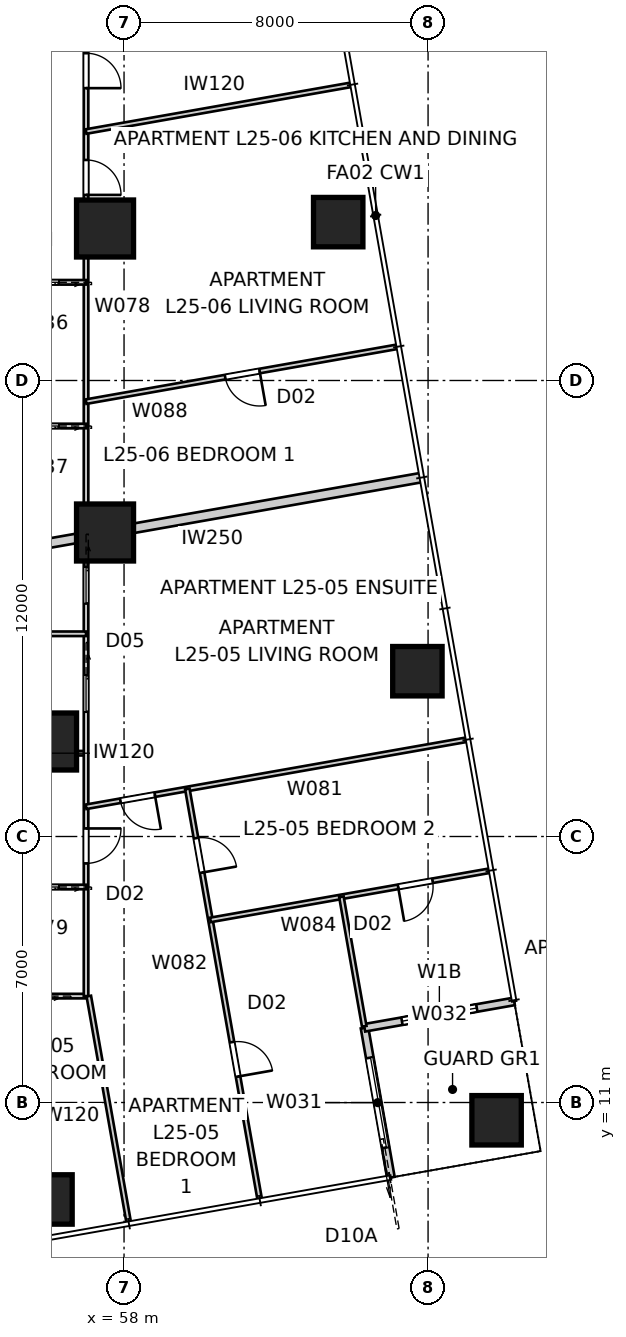
"""IFC4 building model, lengths in metres.
Left out: names, types, materials, properties, quantities, classifications, styles, units other than length and angle.
Written with IfcOpenShell. Run it as: python <this file> out.ifc"""

import sys

from ifc_helpers import new_model, si_unit, direction, frame, frame_2d, origin, origin_2d, place, context, subcontext, project, spatial, rectangle, extrude, element, fill, save


model = new_model("IFC4")
c1 = context("Model", 3, precision=1e-05, world=origin(), true_north=direction((0.0, 1.0)))
c2 = subcontext(c1, "Body", "Model", "MODEL_VIEW")
j1 = project(units=[si_unit("LENGTHUNIT", "METRE"), si_unit("PLANEANGLEUNIT", "RADIAN")], contexts=[c1])
p1 = place(None, origin())
s1 = spatial("IfcSite", under=j1, at=p1, CompositionType="ELEMENT")
p2 = place(p1, origin())
s2 = spatial("IfcBuilding", under=s1, at=p2, CompositionType="ELEMENT")
p3 = place(p2, frame((0.0, 0.0, 93.0)))
s3 = spatial("IfcBuildingStorey", under=s2, at=p3, CompositionType="ELEMENT", Elevation=93.0)
for number, where, z_axis, x_axis in (
    (1, (55.985, 8.448, 0.0), (0.0, 0.0, 1.0), (1.0, 0.0, 0.0)),
    (2, (67.803, 10.532, 0.0), (0.0, 0.0, 1.0), (1.0, 0.0, 0.0)),
    (3, (65.719, 22.35, 0.0), (0.0, 0.0, 1.0), (1.0, 0.0, 0.0)),
    (4, (63.635, 34.167, 0.0), (0.0, 0.0, 1.0), (1.0, 0.0, 0.0)),
):
    element("IfcColumn", number, at=place(p3, frame(where, z_axis=z_axis, x_axis=x_axis)), inside=s3, PredefinedType="COLUMN", context=c2, shape_type="SweptSolid", body=[
        extrude(rectangle(XDim=1.3, YDim=1.3, at=origin_2d()), origin(), (0.0, 0.0, 1.0), 3.4),
    ])
for number, where, z_axis, x_axis in (
    (5, (57.5, 26.0, 0.0), (0.0, 0.0, 1.0), (1.0, 0.0, 0.0)),
    (6, (57.5, 34.0, 0.0), (0.0, 0.0, 1.0), (1.0, 0.0, 0.0)),
    (7, (56.0, 20.5, 0.0), (0.0, 0.0, 1.0), (1.0, 0.0, 0.0)),
):
    element("IfcColumn", number, at=place(p3, frame(where, z_axis=z_axis, x_axis=x_axis)), inside=s3, PredefinedType="COLUMN", context=c2, shape_type="SweptSolid", body=[
        extrude(rectangle(XDim=1.5, YDim=1.5, at=origin_2d()), origin(), (0.0, 0.0, 1.0), 3.4),
    ])
p4 = place(p3, frame((65.022, 9.026, 0.0), z_axis=(0.0, 0.0, 1.0), x_axis=(-0.173646056486, 0.984808127031, 0.0)))
e8 = element("IfcWall", 8, at=p4, inside=s3, PredefinedType="SOLIDWALL", context=c2, shape_type="SweptSolid", body=[
    extrude(rectangle(XDim=4.0, YDim=0.2, at=frame_2d((2.0, 0.0))), origin(), (0.0, 0.0, 1.0), 3.25),
])
p5 = place(p4, frame((0.8, 0.0, 0.0)))
e9 = element("IfcOpeningElement", 9, at=p5, cuts=e8, PredefinedType="OPENING", context=c2, shape_type="SweptSolid", body=[
    extrude(rectangle(XDim=2.4, YDim=2.1, at=frame_2d((1.2, 1.05))), frame((0.0, 0.11, 0.0), z_axis=(0.0, -1.0, 0.0), x_axis=(1.0, 0.0, 0.0)), (0.0, 0.0, 1.0), 0.22),
])
p6 = place(p3, frame((64.328, 12.966, 0.0), z_axis=(0.0, 0.0, 1.0), x_axis=(0.984808127031, 0.173646056486, 0.0)))
e10 = element("IfcWall", 10, at=p6, inside=s3, PredefinedType="SOLIDWALL", context=c2, shape_type="SweptSolid", body=[
    extrude(rectangle(XDim=4.0, YDim=0.2, at=frame_2d((2.0, 0.0))), origin(), (0.0, 0.0, 1.0), 3.25),
])
p7 = place(p6, frame((1.0, 0.0, 0.45)))
e11 = element("IfcOpeningElement", 11, at=p7, cuts=e10, PredefinedType="OPENING", context=c2, shape_type="SweptSolid", body=[
    extrude(rectangle(XDim=2.0, YDim=1.8, at=frame_2d((1.0, 0.9))), frame((0.0, 0.11, 0.0), z_axis=(0.0, -1.0, 0.0), x_axis=(1.0, 0.0, 0.0)), (0.0, 0.0, 1.0), 0.22),
])
p8 = place(p3, frame((65.836, 27.448, 0.0), z_axis=(0.0, 0.0, 1.0), x_axis=(-0.98481000304, -0.173635416642, 0.0)))
e12 = element("IfcWall", 12, at=p8, inside=s3, PredefinedType="PARTITIONING", context=c2, shape_type="SweptSolid", body=[
    extrude(rectangle(XDim=11.427, YDim=0.25, at=frame_2d((5.713, 0.0))), origin(), (0.0, 0.0, 1.0), 3.25),
])
p9 = place(p3, frame((57.0, 13.8, 0.0), z_axis=(0.0, 0.0, 1.0), x_axis=(-1.0, 0.0, 0.0)))
e13 = element("IfcWall", 13, at=p9, inside=s3, PredefinedType="PARTITIONING", context=c2, shape_type="SweptSolid", body=[
    extrude(rectangle(XDim=34.0, YDim=0.12, at=frame_2d((17.0, 0.0))), origin(), (0.0, 0.0, 1.0), 2.55),
])
p10 = place(p9, frame((8.768, 0.0, 0.0)))
e14 = element("IfcOpeningElement", 14, at=p10, cuts=e13, PredefinedType="OPENING", context=c2, shape_type="SweptSolid", body=[
    extrude(rectangle(XDim=0.92, YDim=2.34, at=frame_2d((0.46, 1.17))), frame((0.0, 0.07, 0.0), z_axis=(0.0, -1.0, 0.0), x_axis=(1.0, 0.0, 0.0)), (0.0, 0.0, 1.0), 0.14),
])
p11 = place(p9, frame((10.995, 0.0, 0.0)))
e15 = element("IfcOpeningElement", 15, at=p11, cuts=e13, PredefinedType="OPENING", context=c2, shape_type="SweptSolid", body=[
    extrude(rectangle(XDim=0.92, YDim=2.34, at=frame_2d((0.46, 1.17))), frame((0.0, 0.07, 0.0), z_axis=(0.0, -1.0, 0.0), x_axis=(1.0, 0.0, 0.0)), (0.0, 0.0, 1.0), 0.14),
])
p12 = place(p9, frame((15.486, 0.0, 0.0)))
e16 = element("IfcOpeningElement", 16, at=p12, cuts=e13, PredefinedType="OPENING", context=c2, shape_type="SweptSolid", body=[
    extrude(rectangle(XDim=0.92, YDim=2.34, at=frame_2d((0.46, 1.17))), frame((0.0, 0.07, 0.0), z_axis=(0.0, -1.0, 0.0), x_axis=(1.0, 0.0, 0.0)), (0.0, 0.0, 1.0), 0.14),
])
p13 = place(p9, frame((4.804, 0.0, 0.0)))
e17 = element("IfcOpeningElement", 17, at=p13, cuts=e13, PredefinedType="OPENING", context=c2, shape_type="SweptSolid", body=[
    extrude(rectangle(XDim=0.96, YDim=2.1, at=frame_2d((0.48, 1.05))), frame((0.0, 0.07, 0.0), z_axis=(0.0, -1.0, 0.0), x_axis=(1.0, 0.0, 0.0)), (0.0, 0.0, 1.0), 0.14),
])
p14 = place(p9, frame((19.155, 0.0, 0.0)))
e18 = element("IfcOpeningElement", 18, at=p14, cuts=e13, PredefinedType="OPENING", context=c2, shape_type="SweptSolid", body=[
    extrude(rectangle(XDim=0.96, YDim=2.1, at=frame_2d((0.48, 1.05))), frame((0.0, 0.07, 0.0), z_axis=(0.0, -1.0, 0.0), x_axis=(1.0, 0.0, 0.0)), (0.0, 0.0, 1.0), 0.14),
])
p15 = place(p9, frame((31.473, 0.0, 0.0)))
e19 = element("IfcOpeningElement", 19, at=p15, cuts=e13, PredefinedType="OPENING", context=c2, shape_type="SweptSolid", body=[
    extrude(rectangle(XDim=0.96, YDim=2.1, at=frame_2d((0.48, 1.05))), frame((0.0, 0.07, 0.0), z_axis=(0.0, -1.0, 0.0), x_axis=(1.0, 0.0, 0.0)), (0.0, 0.0, 1.0), 0.14),
])
p16 = place(p9, frame((1.261, 0.0, 0.0)))
e20 = element("IfcOpeningElement", 20, at=p16, cuts=e13, PredefinedType="OPENING", context=c2, shape_type="SweptSolid", body=[
    extrude(rectangle(XDim=0.96, YDim=2.1, at=frame_2d((0.48, 1.05))), frame((0.0, 0.07, 0.0), z_axis=(0.0, -1.0, 0.0), x_axis=(1.0, 0.0, 0.0)), (0.0, 0.0, 1.0), 0.14),
])
p17 = place(p9, frame((22.627, 0.0, 0.0)))
e21 = element("IfcOpeningElement", 21, at=p17, cuts=e13, PredefinedType="OPENING", context=c2, shape_type="SweptSolid", body=[
    extrude(rectangle(XDim=0.96, YDim=2.1, at=frame_2d((0.48, 1.05))), frame((0.0, 0.07, 0.0), z_axis=(0.0, -1.0, 0.0), x_axis=(1.0, 0.0, 0.0)), (0.0, 0.0, 1.0), 0.14),
])
p18 = place(p3, frame((54.6, 20.192, 0.0), z_axis=(0.0, 0.0, 1.0), x_axis=(1.0, 0.0, 0.0)))
e22 = element("IfcWall", 22, at=p18, inside=s3, PredefinedType="PARTITIONING", context=c2, shape_type="SweptSolid", body=[
    extrude(rectangle(XDim=2.4, YDim=0.12, at=frame_2d((1.2, 0.0))), origin(), (0.0, 0.0, 1.0), 3.25),
])
p19 = place(p3, frame((57.0, 46.2, 0.0), z_axis=(0.0, 0.0, 1.0), x_axis=(0.0, -1.0, 0.0)))
e23 = element("IfcWall", 23, at=p19, inside=s3, PredefinedType="PARTITIONING", context=c2, shape_type="SweptSolid", body=[
    extrude(rectangle(XDim=32.4, YDim=0.12, at=frame_2d((16.2, 0.0))), origin(), (0.0, 0.0, 1.0), 2.55),
])
p20 = place(p19, frame((10.396, 0.0, 0.0)))
e24 = element("IfcOpeningElement", 24, at=p20, cuts=e23, PredefinedType="OPENING", context=c2, shape_type="SweptSolid", body=[
    extrude(rectangle(XDim=0.92, YDim=2.34, at=frame_2d((0.46, 1.17))), frame((0.0, 0.07, 0.0), z_axis=(0.0, -1.0, 0.0), x_axis=(1.0, 0.0, 0.0)), (0.0, 0.0, 1.0), 0.14),
])
p21 = place(p19, frame((7.587, 0.0, 0.0)))
e25 = element("IfcOpeningElement", 25, at=p21, cuts=e23, PredefinedType="OPENING", context=c2, shape_type="SweptSolid", body=[
    extrude(rectangle(XDim=0.92, YDim=2.34, at=frame_2d((0.46, 1.17))), frame((0.0, 0.07, 0.0), z_axis=(0.0, -1.0, 0.0), x_axis=(1.0, 0.0, 0.0)), (0.0, 0.0, 1.0), 0.14),
])
p22 = place(p19, frame((3.843, 0.0, 0.0)))
e26 = element("IfcOpeningElement", 26, at=p22, cuts=e23, PredefinedType="OPENING", context=c2, shape_type="SweptSolid", body=[
    extrude(rectangle(XDim=0.92, YDim=2.34, at=frame_2d((0.46, 1.17))), frame((0.0, 0.07, 0.0), z_axis=(0.0, -1.0, 0.0), x_axis=(1.0, 0.0, 0.0)), (0.0, 0.0, 1.0), 0.14),
])
p23 = place(p19, frame((27.988, 0.0, 0.0)))
e27 = element("IfcOpeningElement", 27, at=p23, cuts=e23, PredefinedType="OPENING", context=c2, shape_type="SweptSolid", body=[
    extrude(rectangle(XDim=0.92, YDim=2.34, at=frame_2d((0.46, 1.17))), frame((0.0, 0.07, 0.0), z_axis=(0.0, -1.0, 0.0), x_axis=(1.0, 0.0, 0.0)), (0.0, 0.0, 1.0), 0.14),
])
p24 = place(p19, frame((23.957, 0.0, 0.0)))
e28 = element("IfcOpeningElement", 28, at=p24, cuts=e23, PredefinedType="OPENING", context=c2, shape_type="SweptSolid", body=[
    extrude(rectangle(XDim=0.96, YDim=2.1, at=frame_2d((0.48, 1.05))), frame((0.0, 0.07, 0.0), z_axis=(0.0, -1.0, 0.0), x_axis=(1.0, 0.0, 0.0)), (0.0, 0.0, 1.0), 0.14),
])
p25 = place(p19, frame((21.108, 0.0, 0.0)))
e29 = element("IfcOpeningElement", 29, at=p25, cuts=e23, PredefinedType="OPENING", context=c2, shape_type="SweptSolid", body=[
    extrude(rectangle(XDim=0.96, YDim=2.1, at=frame_2d((0.48, 1.05))), frame((0.0, 0.07, 0.0), z_axis=(0.0, -1.0, 0.0), x_axis=(1.0, 0.0, 0.0)), (0.0, 0.0, 1.0), 0.14),
])
p26 = place(p3, frame((57.0, 16.671, 0.0), z_axis=(0.0, 0.0, 1.0), x_axis=(-1.0, 0.0, 0.0)))
e30 = element("IfcWall", 30, at=p26, inside=s3, PredefinedType="PARTITIONING", context=c2, shape_type="SweptSolid", body=[
    extrude(rectangle(XDim=2.4, YDim=0.12, at=frame_2d((1.2, 0.0))), origin(), (0.0, 0.0, 1.0), 3.25),
])
p27 = place(p26, frame((0.72, 0.0, 0.0)))
e31 = element("IfcOpeningElement", 31, at=p27, cuts=e30, PredefinedType="OPENING", context=c2, shape_type="SweptSolid", body=[
    extrude(rectangle(XDim=0.96, YDim=2.1, at=frame_2d((0.48, 1.05))), frame((0.0, 0.07, 0.0), z_axis=(0.0, -1.0, 0.0), x_axis=(1.0, 0.0, 0.0)), (0.0, 0.0, 1.0), 0.14),
])
p28 = place(p3, frame((54.6, 23.335, 0.0), z_axis=(0.0, 0.0, 1.0), x_axis=(1.0, 0.0, 0.0)))
e32 = element("IfcWall", 32, at=p28, inside=s3, PredefinedType="PARTITIONING", context=c2, shape_type="SweptSolid", body=[
    extrude(rectangle(XDim=2.4, YDim=0.12, at=frame_2d((1.2, 0.0))), origin(), (0.0, 0.0, 1.0), 3.25),
])
p29 = place(p3, frame((67.012, 20.547, 0.0), z_axis=(0.0, 0.0, 1.0), x_axis=(-0.984807724889, -0.173648337162, 0.0)))
e33 = element("IfcWall", 33, at=p29, inside=s3, PredefinedType="PARTITIONING", context=c2, shape_type="SweptSolid", body=[
    extrude(rectangle(XDim=10.167, YDim=0.12, at=frame_2d((5.083, 0.0))), origin(), (0.0, 0.0, 1.0), 2.638),
])
p30 = place(p29, frame((8.328, 0.0, 0.0)))
e34 = element("IfcOpeningElement", 34, at=p30, cuts=e33, PredefinedType="OPENING", context=c2, shape_type="SweptSolid", body=[
    extrude(rectangle(XDim=0.92, YDim=2.34, at=frame_2d((0.46, 1.17))), frame((0.0, 0.07, 0.0), z_axis=(0.0, -1.0, 0.0), x_axis=(1.0, 0.0, 0.0)), (0.0, 0.0, 1.0), 0.14),
])
p31 = place(p3, frame((59.665, 19.251, 0.0), z_axis=(0.0, 0.0, 1.0), x_axis=(0.173639194339, -0.984809336973, 0.0)))
e35 = element("IfcWall", 35, at=p31, inside=s3, PredefinedType="PARTITIONING", context=c2, shape_type="SweptSolid", body=[
    extrude(rectangle(XDim=10.96, YDim=0.12, at=frame_2d((5.48, 0.0))), origin(), (0.0, 0.0, 1.0), 3.25),
])
p32 = place(p31, frame((6.765, 0.0, 0.0)))
e36 = element("IfcOpeningElement", 36, at=p32, cuts=e35, PredefinedType="OPENING", context=c2, shape_type="SweptSolid", body=[
    extrude(rectangle(XDim=0.92, YDim=2.34, at=frame_2d((0.46, 1.17))), frame((0.0, 0.07, 0.0), z_axis=(0.0, -1.0, 0.0), x_axis=(1.0, 0.0, 0.0)), (0.0, 0.0, 1.0), 0.14),
])
p33 = place(p31, frame((1.315, 0.0, 0.0)))
e37 = element("IfcOpeningElement", 37, at=p33, cuts=e35, PredefinedType="OPENING", context=c2, shape_type="SweptSolid", body=[
    extrude(rectangle(XDim=0.92, YDim=2.34, at=frame_2d((0.46, 1.17))), frame((0.0, 0.07, 0.0), z_axis=(0.0, -1.0, 0.0), x_axis=(1.0, 0.0, 0.0)), (0.0, 0.0, 1.0), 0.14),
])
p34 = place(p3, frame((58.122, 7.85, 0.0), z_axis=(0.0, 0.0, 1.0), x_axis=(-0.173644708382, 0.984808364734, 0.0)))
e38 = element("IfcWall", 38, at=p34, inside=s3, PredefinedType="PARTITIONING", context=c2, shape_type="SweptSolid", body=[
    extrude(rectangle(XDim=6.042, YDim=0.12, at=frame_2d((3.021, 0.0))), origin(), (0.0, 0.0, 1.0), 2.638),
])
p35 = place(p3, frame((67.62, 17.1, 0.0), z_axis=(0.0, 0.0, 1.0), x_axis=(-0.984807929323, -0.173647177755, 0.0)))
e39 = element("IfcWall", 39, at=p35, inside=s3, PredefinedType="PARTITIONING", context=c2, shape_type="SweptSolid", body=[
    extrude(rectangle(XDim=7.46, YDim=0.12, at=frame_2d((3.73, 0.0))), origin(), (0.0, 0.0, 1.0), 3.25),
])
p36 = place(p35, frame((1.525, 0.0, 0.0)))
e40 = element("IfcOpeningElement", 40, at=p36, cuts=e39, PredefinedType="OPENING", context=c2, shape_type="SweptSolid", body=[
    extrude(rectangle(XDim=0.92, YDim=2.34, at=frame_2d((0.46, 1.17))), frame((0.0, 0.07, 0.0), z_axis=(0.0, -1.0, 0.0), x_axis=(1.0, 0.0, 0.0)), (0.0, 0.0, 1.0), 0.14),
])
p37 = place(p3, frame((63.72, 16.412, 0.0), z_axis=(0.0, 0.0, 1.0), x_axis=(0.173660541335, -0.984805572884, 0.0)))
e41 = element("IfcWall", 41, at=p37, inside=s3, PredefinedType="PARTITIONING", context=c2, shape_type="SweptSolid", body=[
    extrude(rectangle(XDim=3.46, YDim=0.12, at=frame_2d((1.73, 0.0))), origin(), (0.0, 0.0, 1.0), 3.25),
])
p38 = place(p3, frame((57.0, 32.585, 0.0), z_axis=(0.0, 0.0, 1.0), x_axis=(-1.0, 0.0, 0.0)))
e42 = element("IfcWall", 42, at=p38, inside=s3, PredefinedType="PARTITIONING", context=c2, shape_type="SweptSolid", body=[
    extrude(rectangle(XDim=2.4, YDim=0.12, at=frame_2d((1.2, 0.0))), origin(), (0.0, 0.0, 1.0), 3.25),
])
p39 = place(p38, frame((0.72, 0.0, 0.0)))
e43 = element("IfcOpeningElement", 43, at=p39, cuts=e42, PredefinedType="OPENING", context=c2, shape_type="SweptSolid", body=[
    extrude(rectangle(XDim=0.96, YDim=2.1, at=frame_2d((0.48, 1.05))), frame((0.0, 0.07, 0.0), z_axis=(0.0, -1.0, 0.0), x_axis=(1.0, 0.0, 0.0)), (0.0, 0.0, 1.0), 0.14),
])
p40 = place(p3, frame((57.0, 28.802, 0.0), z_axis=(0.0, 0.0, 1.0), x_axis=(-1.0, 0.0, 0.0)))
e44 = element("IfcWall", 44, at=p40, inside=s3, PredefinedType="PARTITIONING", context=c2, shape_type="SweptSolid", body=[
    extrude(rectangle(XDim=2.4, YDim=0.12, at=frame_2d((1.2, 0.0))), origin(), (0.0, 0.0, 1.0), 3.25),
])
p41 = place(p40, frame((0.72, 0.0, 0.0)))
e45 = element("IfcOpeningElement", 45, at=p41, cuts=e44, PredefinedType="OPENING", context=c2, shape_type="SweptSolid", body=[
    extrude(rectangle(XDim=0.96, YDim=2.1, at=frame_2d((0.48, 1.05))), frame((0.0, 0.07, 0.0), z_axis=(0.0, -1.0, 0.0), x_axis=(1.0, 0.0, 0.0)), (0.0, 0.0, 1.0), 0.14),
])
p42 = place(p3, frame((65.188, 30.887, 0.0), z_axis=(0.0, 0.0, 1.0), x_axis=(-0.984807787824, -0.173647980238, 0.0)))
e46 = element("IfcWall", 46, at=p42, inside=s3, PredefinedType="PARTITIONING", context=c2, shape_type="SweptSolid", body=[
    extrude(rectangle(XDim=8.315, YDim=0.12, at=frame_2d((4.157, 0.0))), origin(), (0.0, 0.0, 1.0), 3.25),
])
p43 = place(p42, frame((3.677, 0.0, 0.0)))
e47 = element("IfcOpeningElement", 47, at=p43, cuts=e46, PredefinedType="OPENING", context=c2, shape_type="SweptSolid", body=[
    extrude(rectangle(XDim=0.92, YDim=2.34, at=frame_2d((0.46, 1.17))), frame((0.0, 0.07, 0.0), z_axis=(0.0, -1.0, 0.0), x_axis=(1.0, 0.0, 0.0)), (0.0, 0.0, 1.0), 0.14),
])
p44 = place(p3, frame((57.0, 36.552, 0.0), z_axis=(0.0, 0.0, 1.0), x_axis=(0.984809234282, 0.173639776761, 0.0)))
e48 = element("IfcWall", 48, at=p44, inside=s3, PredefinedType="PARTITIONING", context=c2, shape_type="SweptSolid", body=[
    extrude(rectangle(XDim=7.081, YDim=0.12, at=frame_2d((3.541, 0.0))), origin(), (0.0, 0.0, 1.0), 3.25),
])
p45 = place(p5, origin())
e49 = element("IfcDoor", 49, at=p45, inside=s3, OperationType="SLIDING_TO_LEFT", PredefinedType="DOOR", context=c2, shape_type="SweptSolid", body=[
    extrude(rectangle(XDim=2.4, YDim=2.1, at=frame_2d((1.2, 1.05))), frame((0.0, 0.025, 0.0), z_axis=(0.0, -1.0, 0.0), x_axis=(1.0, 0.0, 0.0)), (0.0, 0.0, 1.0), 0.05),
])
fill(e9, e49)
p46 = place(p7, origin())
e50 = element("IfcWindow", 50, at=p46, inside=s3, PartitioningType="SINGLE_PANEL", PredefinedType="WINDOW", context=c2, shape_type="SweptSolid", body=[
    extrude(rectangle(XDim=2.0, YDim=1.8, at=frame_2d((1.0, 0.9))), frame((0.0, 0.03, 0.0), z_axis=(0.0, -1.0, 0.0), x_axis=(1.0, 0.0, 0.0)), (0.0, 0.0, 1.0), 0.06),
])
fill(e11, e50)
p47 = place(p20, origin())
e51 = element("IfcDoor", 51, at=p47, inside=s3, OperationType="SINGLE_SWING_RIGHT", PredefinedType="DOOR", context=c2, shape_type="SweptSolid", body=[
    extrude(rectangle(XDim=0.92, YDim=2.34, at=frame_2d((0.46, 1.17))), frame((0.0, 0.025, 0.0), z_axis=(0.0, -1.0, 0.0), x_axis=(1.0, 0.0, 0.0)), (0.0, 0.0, 1.0), 0.05),
])
fill(e24, e51)
p48 = place(p21, origin())
e52 = element("IfcDoor", 52, at=p48, inside=s3, OperationType="SINGLE_SWING_RIGHT", PredefinedType="DOOR", context=c2, shape_type="SweptSolid", body=[
    extrude(rectangle(XDim=0.92, YDim=2.34, at=frame_2d((0.46, 1.17))), frame((0.0, 0.025, 0.0), z_axis=(0.0, -1.0, 0.0), x_axis=(1.0, 0.0, 0.0)), (0.0, 0.0, 1.0), 0.05),
])
fill(e25, e52)
p49 = place(p39, origin())
e53 = element("IfcDoor", 53, at=p49, inside=s3, OperationType="SLIDING_TO_LEFT", PredefinedType="DOOR", context=c2, shape_type="SweptSolid", body=[
    extrude(rectangle(XDim=0.96, YDim=2.1, at=frame_2d((0.48, 1.05))), frame((0.0, 0.025, 0.0), z_axis=(0.0, -1.0, 0.0), x_axis=(1.0, 0.0, 0.0)), (0.0, 0.0, 1.0), 0.05),
])
fill(e43, e53)
p50 = place(p27, origin())
e54 = element("IfcDoor", 54, at=p50, inside=s3, OperationType="SLIDING_TO_LEFT", PredefinedType="DOOR", context=c2, shape_type="SweptSolid", body=[
    extrude(rectangle(XDim=0.96, YDim=2.1, at=frame_2d((0.48, 1.05))), frame((0.0, 0.025, 0.0), z_axis=(0.0, -1.0, 0.0), x_axis=(1.0, 0.0, 0.0)), (0.0, 0.0, 1.0), 0.05),
])
fill(e31, e54)
p51 = place(p23, origin())
e55 = element("IfcDoor", 55, at=p51, inside=s3, OperationType="SINGLE_SWING_LEFT", PredefinedType="DOOR", context=c2, shape_type="SweptSolid", body=[
    extrude(rectangle(XDim=0.92, YDim=2.34, at=frame_2d((0.46, 1.17))), frame((0.0, 0.025, 0.0), z_axis=(0.0, -1.0, 0.0), x_axis=(1.0, 0.0, 0.0)), (0.0, 0.0, 1.0), 0.05),
])
fill(e27, e55)
p52 = place(p43, origin())
e56 = element("IfcDoor", 56, at=p52, inside=s3, OperationType="SINGLE_SWING_LEFT", PredefinedType="DOOR", context=c2, shape_type="SweptSolid", body=[
    extrude(rectangle(XDim=0.92, YDim=2.34, at=frame_2d((0.46, 1.17))), frame((0.0, 0.025, 0.0), z_axis=(0.0, -1.0, 0.0), x_axis=(1.0, 0.0, 0.0)), (0.0, 0.0, 1.0), 0.05),
])
fill(e47, e56)
p53 = place(p41, origin())
e57 = element("IfcDoor", 57, at=p53, inside=s3, OperationType="SLIDING_TO_LEFT", PredefinedType="DOOR", context=c2, shape_type="SweptSolid", body=[
    extrude(rectangle(XDim=0.96, YDim=2.1, at=frame_2d((0.48, 1.05))), frame((0.0, 0.025, 0.0), z_axis=(0.0, -1.0, 0.0), x_axis=(1.0, 0.0, 0.0)), (0.0, 0.0, 1.0), 0.05),
])
fill(e45, e57)
p54 = place(p32, origin())
e58 = element("IfcDoor", 58, at=p54, inside=s3, OperationType="SINGLE_SWING_RIGHT", PredefinedType="DOOR", context=c2, shape_type="SweptSolid", body=[
    extrude(rectangle(XDim=0.92, YDim=2.34, at=frame_2d((0.46, 1.17))), frame((0.0, 0.025, 0.0), z_axis=(0.0, -1.0, 0.0), x_axis=(1.0, 0.0, 0.0)), (0.0, 0.0, 1.0), 0.05),
])
fill(e36, e58)
p55 = place(p33, origin())
e59 = element("IfcDoor", 59, at=p55, inside=s3, OperationType="SINGLE_SWING_RIGHT", PredefinedType="DOOR", context=c2, shape_type="SweptSolid", body=[
    extrude(rectangle(XDim=0.92, YDim=2.34, at=frame_2d((0.46, 1.17))), frame((0.0, 0.025, 0.0), z_axis=(0.0, -1.0, 0.0), x_axis=(1.0, 0.0, 0.0)), (0.0, 0.0, 1.0), 0.05),
])
fill(e37, e59)
p56 = place(p30, origin())
e60 = element("IfcDoor", 60, at=p56, inside=s3, OperationType="SINGLE_SWING_LEFT", PredefinedType="DOOR", context=c2, shape_type="SweptSolid", body=[
    extrude(rectangle(XDim=0.92, YDim=2.34, at=frame_2d((0.46, 1.17))), frame((0.0, 0.025, 0.0), z_axis=(0.0, -1.0, 0.0), x_axis=(1.0, 0.0, 0.0)), (0.0, 0.0, 1.0), 0.05),
])
fill(e34, e60)
p57 = place(p24, origin())
e61 = element("IfcDoor", 61, at=p57, inside=s3, OperationType="SLIDING_TO_LEFT", PredefinedType="DOOR", context=c2, shape_type="SweptSolid", body=[
    extrude(rectangle(XDim=0.96, YDim=2.1, at=frame_2d((0.48, 1.05))), frame((0.0, 0.025, 0.0), z_axis=(0.0, -1.0, 0.0), x_axis=(1.0, 0.0, 0.0)), (0.0, 0.0, 1.0), 0.05),
])
fill(e28, e61)
p58 = place(p25, origin())
e62 = element("IfcDoor", 62, at=p58, inside=s3, OperationType="SLIDING_TO_LEFT", PredefinedType="DOOR", context=c2, shape_type="SweptSolid", body=[
    extrude(rectangle(XDim=0.96, YDim=2.1, at=frame_2d((0.48, 1.05))), frame((0.0, 0.025, 0.0), z_axis=(0.0, -1.0, 0.0), x_axis=(1.0, 0.0, 0.0)), (0.0, 0.0, 1.0), 0.05),
])
fill(e29, e62)
p59 = place(p36, origin())
e63 = element("IfcDoor", 63, at=p59, inside=s3, OperationType="SINGLE_SWING_RIGHT", PredefinedType="DOOR", context=c2, shape_type="SweptSolid", body=[
    extrude(rectangle(XDim=0.92, YDim=2.34, at=frame_2d((0.46, 1.17))), frame((0.0, 0.025, 0.0), z_axis=(0.0, -1.0, 0.0), x_axis=(1.0, 0.0, 0.0)), (0.0, 0.0, 1.0), 0.05),
])
fill(e40, e63)
save(model, sys.argv[1])
